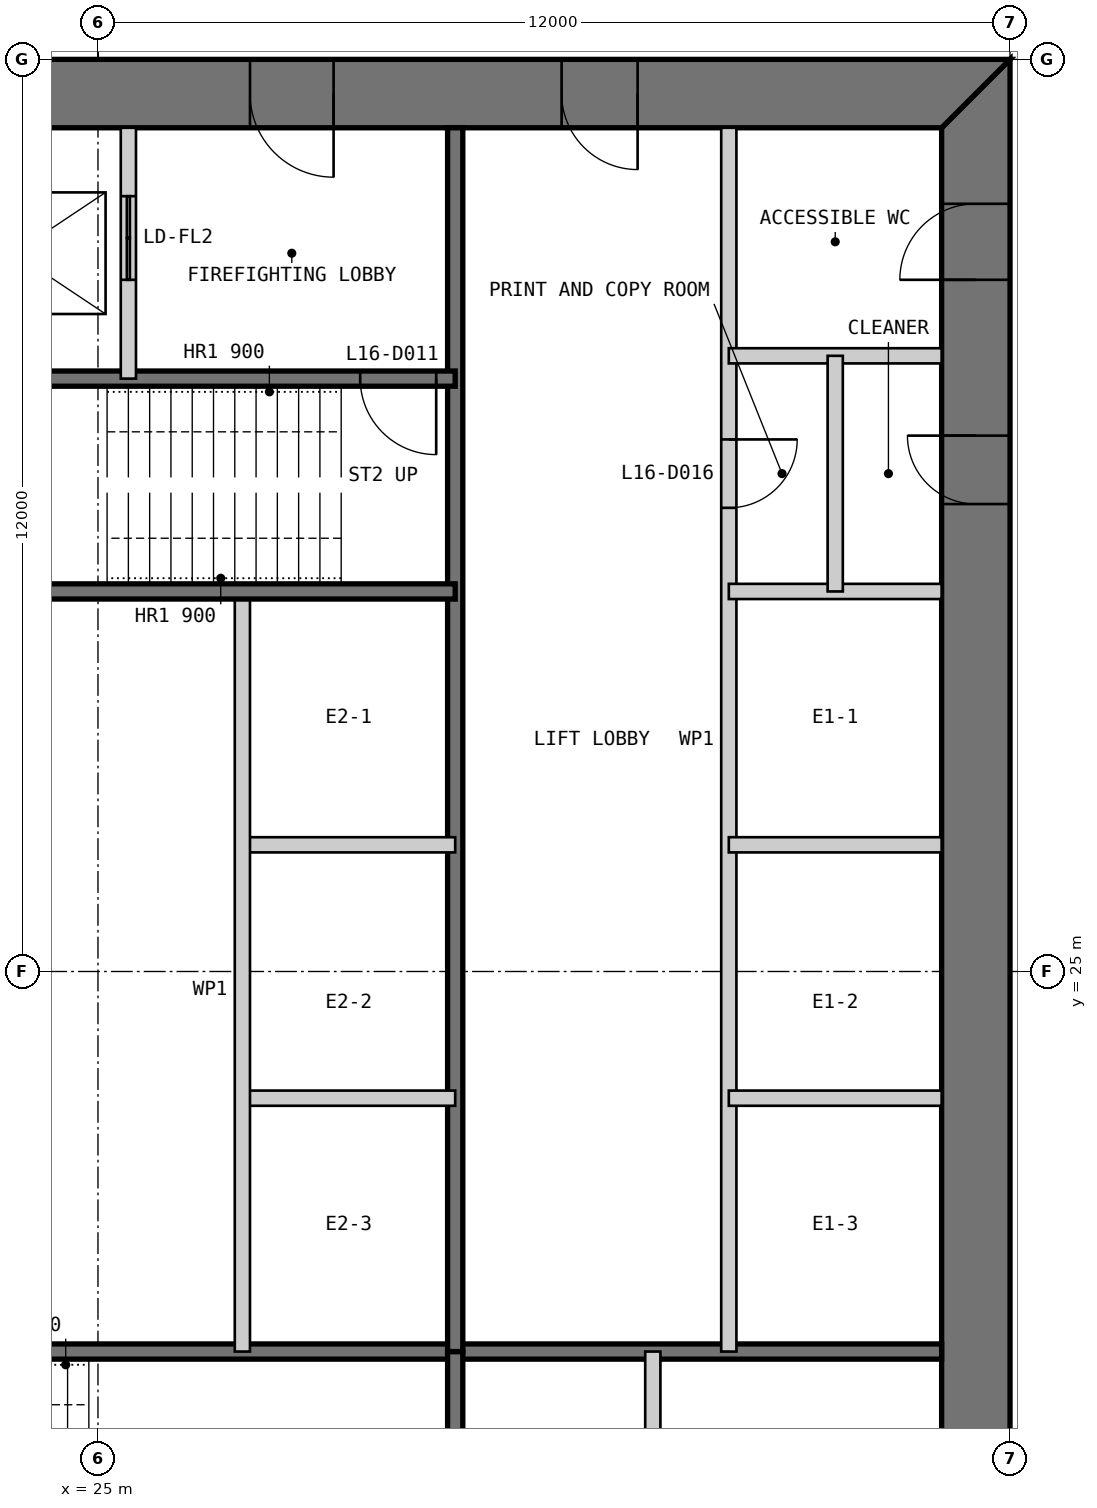
"""IFC4 building model, lengths in metres.
Left out: names, types, materials, properties, quantities, classifications, styles, units other than length and angle.
Written with IfcOpenShell. Run it as: python <this file> out.ifc"""

import sys

from ifc_helpers import new_model, si_unit, direction, frame, frame_2d, origin, place, context, subcontext, project, spatial, polyline, rectangle, outline, extrude, element, fill, save


model = new_model("IFC4")
c1 = context("Model", 3, precision=1e-05, world=origin(), true_north=direction((0.0, 1.0)))
c2 = subcontext(c1, "Body", "Model", "MODEL_VIEW")
j1 = project(units=[si_unit("LENGTHUNIT", "METRE"), si_unit("PLANEANGLEUNIT", "RADIAN")], contexts=[c1])
p1 = place(None, origin())
s1 = spatial("IfcSite", under=j1, at=p1, CompositionType="ELEMENT")
p2 = place(p1, origin())
s2 = spatial("IfcBuilding", under=s1, at=p2, CompositionType="ELEMENT")
p3 = place(p2, frame((0.0, 0.0, 71.0)))
s3 = spatial("IfcBuildingStorey", under=s2, at=p3, CompositionType="ELEMENT", Elevation=71.0)
p4 = place(p3, frame((36.55, 13.9, 0.0), z_axis=(0.0, 0.0, 1.0), x_axis=(0.0, 1.0, 0.0)))
e1 = element("IfcWall", 1, at=p4, inside=s3, PredefinedType="SHEAR", context=c2, shape_type="SweptSolid", body=[
    extrude(outline(polyline([(-0.9, -0.45), (23.1, -0.45), (22.2, 0.45), (0.0, 0.45), (-0.9, -0.45)])), origin(), (0.0, 0.0, 1.0), 4.0),
])
p5 = place(p4, frame((20.2, 0.0, 0.0)))
e2 = element("IfcOpeningElement", 2, at=p5, cuts=e1, PredefinedType="OPENING", context=c2, shape_type="SweptSolid", body=[
    extrude(rectangle(XDim=1.0, YDim=2.2, at=frame_2d((0.5, 1.1))), frame((0.0, 0.46, 0.0), z_axis=(0.0, -1.0, 0.0), x_axis=(1.0, 0.0, 0.0)), (0.0, 0.0, 1.0), 0.92),
])
p6 = place(p4, frame((17.25, 0.0, 0.0)))
e3 = element("IfcOpeningElement", 3, at=p6, cuts=e1, PredefinedType="OPENING", context=c2, shape_type="SweptSolid", body=[
    extrude(rectangle(XDim=0.9, YDim=2.2, at=frame_2d((0.45, 1.1))), frame((0.0, 0.46, 0.0), z_axis=(0.0, -1.0, 0.0), x_axis=(1.0, 0.0, 0.0)), (0.0, 0.0, 1.0), 0.92),
])
p7 = place(p3, frame((37.0, 36.55, 0.0), z_axis=(0.0, 0.0, 1.0), x_axis=(-1.0, 0.0, 0.0)))
e4 = element("IfcWall", 4, at=p7, inside=s3, PredefinedType="SHEAR", context=c2, shape_type="SweptSolid", body=[
    extrude(outline(polyline([(0.0, -0.45), (24.0, -0.45), (23.1, 0.45), (0.9, 0.45), (0.0, -0.45)])), origin(), (0.0, 0.0, 1.0), 4.0),
])
p8 = place(p7, frame((4.9, 0.0, 0.0)))
e5 = element("IfcOpeningElement", 5, at=p8, cuts=e4, PredefinedType="OPENING", context=c2, shape_type="SweptSolid", body=[
    extrude(rectangle(XDim=1.0, YDim=2.2, at=frame_2d((0.5, 1.1))), frame((0.0, 0.46, 0.0), z_axis=(0.0, -1.0, 0.0), x_axis=(1.0, 0.0, 0.0)), (0.0, 0.0, 1.0), 0.92),
])
p9 = place(p7, frame((8.9, 0.0, 0.0)))
e6 = element("IfcOpeningElement", 6, at=p9, cuts=e4, PredefinedType="OPENING", context=c2, shape_type="SweptSolid", body=[
    extrude(rectangle(XDim=1.1, YDim=2.2, at=frame_2d((0.55, 1.1))), frame((0.0, 0.46, 0.0), z_axis=(0.0, -1.0, 0.0), x_axis=(1.0, 0.0, 0.0)), (0.0, 0.0, 1.0), 0.92),
])
p10 = place(p7, frame((15.05, 0.0, 0.0)))
e7 = element("IfcOpeningElement", 7, at=p10, cuts=e4, PredefinedType="OPENING", context=c2, shape_type="SweptSolid", body=[
    extrude(rectangle(XDim=0.9, YDim=2.2, at=frame_2d((0.45, 1.1))), frame((0.0, 0.46, 0.0), z_axis=(0.0, -1.0, 0.0), x_axis=(1.0, 0.0, 0.0)), (0.0, 0.0, 1.0), 0.92),
])
p11 = place(p7, frame((17.9, 0.0, 0.0)))
e8 = element("IfcOpeningElement", 8, at=p11, cuts=e4, PredefinedType="OPENING", context=c2, shape_type="SweptSolid", body=[
    extrude(rectangle(XDim=1.0, YDim=2.2, at=frame_2d((0.5, 1.1))), frame((0.0, 0.46, 0.0), z_axis=(0.0, -1.0, 0.0), x_axis=(1.0, 0.0, 0.0)), (0.0, 0.0, 1.0), 0.92),
])
p12 = place(p7, frame((21.4, 0.0, 0.0)))
e9 = element("IfcOpeningElement", 9, at=p12, cuts=e4, PredefinedType="OPENING", context=c2, shape_type="SweptSolid", body=[
    extrude(rectangle(XDim=1.0, YDim=2.2, at=frame_2d((0.5, 1.1))), frame((0.0, 0.46, 0.0), z_axis=(0.0, -1.0, 0.0), x_axis=(1.0, 0.0, 0.0)), (0.0, 0.0, 1.0), 0.92),
])
p13 = place(p3, frame((20.3, 20.0, 0.0), z_axis=(0.0, 0.0, 1.0), x_axis=(1.0, 0.0, 0.0)))
e10 = element("IfcWall", 10, at=p13, inside=s3, PredefinedType="SOLIDWALL", context=c2, shape_type="SweptSolid", body=[
    extrude(rectangle(XDim=15.8, YDim=0.2, at=frame_2d((7.9, 0.0))), origin(), (0.0, 0.0, 1.0), 3.8),
])
p14 = place(p3, frame((29.7, 13.9, 0.0), z_axis=(0.0, 0.0, 1.0), x_axis=(0.0, 1.0, 0.0)))
e11 = element("IfcWall", 11, at=p14, inside=s3, PredefinedType="SOLIDWALL", context=c2, shape_type="SweptSolid", body=[
    extrude(rectangle(XDim=6.1, YDim=0.2, at=frame_2d((3.05, 0.0))), origin(), (0.0, 0.0, 1.0), 3.8),
])
p15 = place(p3, frame((32.3, 13.9, 0.0), z_axis=(0.0, 0.0, 1.0), x_axis=(0.0, 1.0, 0.0)))
e12 = element("IfcWall", 12, at=p15, inside=s3, PredefinedType="PARTITIONING", context=c2, shape_type="SweptSolid", body=[
    extrude(rectangle(XDim=6.1, YDim=0.2, at=frame_2d((3.05, 0.0))), origin(), (0.0, 0.0, 1.0), 3.8),
])
p16 = place(p3, frame((33.3, 36.1, 0.0), z_axis=(0.0, 0.0, 1.0), x_axis=(0.0, -1.0, 0.0)))
e13 = element("IfcWall", 13, at=p16, inside=s3, PredefinedType="PARTITIONING", context=c2, shape_type="SweptSolid", body=[
    extrude(rectangle(XDim=16.1, YDim=0.2, at=frame_2d((8.05, 0.0))), origin(), (0.0, 0.0, 1.0), 3.8),
])
p17 = place(p16, frame((4.1, 0.0, 0.0)))
e14 = element("IfcOpeningElement", 14, at=p17, cuts=e13, PredefinedType="OPENING", context=c2, shape_type="SweptSolid", body=[
    extrude(rectangle(XDim=0.9, YDim=2.2, at=frame_2d((0.45, 1.1))), frame((0.0, 0.11, 0.0), z_axis=(0.0, -1.0, 0.0), x_axis=(1.0, 0.0, 0.0)), (0.0, 0.0, 1.0), 0.22),
])
p18 = place(p3, frame((29.7, 36.1, 0.0), z_axis=(0.0, 0.0, 1.0), x_axis=(0.0, -1.0, 0.0)))
e15 = element("IfcWall", 15, at=p18, inside=s3, PredefinedType="SOLIDWALL", context=c2, shape_type="SweptSolid", body=[
    extrude(rectangle(XDim=16.1, YDim=0.2, at=frame_2d((8.05, 0.0))), origin(), (0.0, 0.0, 1.0), 3.8),
])
for number, where, z_axis, x_axis in (
    (16, (36.1, 30.0, 0.0), (0.0, 0.0, 1.0), (-1.0, 0.0, 0.0)),
    (17, (36.1, 26.667, 0.0), (0.0, 0.0, 1.0), (-1.0, 0.0, 0.0)),
    (18, (36.1, 23.333, 0.0), (0.0, 0.0, 1.0), (-1.0, 0.0, 0.0)),
    (19, (29.7, 26.667, 0.0), (0.0, 0.0, 1.0), (-1.0, 0.0, 0.0)),
    (20, (29.7, 23.333, 0.0), (0.0, 0.0, 1.0), (-1.0, 0.0, 0.0)),
):
    element("IfcWall", number, at=place(p3, frame(where, z_axis=z_axis, x_axis=x_axis)), inside=s3, PredefinedType="PARTITIONING", context=c2, shape_type="SweptSolid", body=[
        extrude(rectangle(XDim=2.8, YDim=0.2, at=frame_2d((1.4, 0.0))), origin(), (0.0, 0.0, 1.0), 3.8),
    ])
p19 = place(p3, frame((26.9, 30.0, 0.0), z_axis=(0.0, 0.0, 1.0), x_axis=(0.0, -1.0, 0.0)))
e21 = element("IfcWall", 21, at=p19, inside=s3, PredefinedType="PARTITIONING", context=c2, shape_type="SweptSolid", body=[
    extrude(rectangle(XDim=10.0, YDim=0.2, at=frame_2d((5.0, 0.0))), origin(), (0.0, 0.0, 1.0), 3.8),
])
p20 = place(p3, frame((29.7, 32.8, 0.0), z_axis=(0.0, 0.0, 1.0), x_axis=(-1.0, 0.0, 0.0)))
e22 = element("IfcWall", 22, at=p20, inside=s3, PredefinedType="SOLIDWALL", context=c2, shape_type="SweptSolid", body=[
    extrude(rectangle(XDim=9.4, YDim=0.2, at=frame_2d((4.7, 0.0))), origin(), (0.0, 0.0, 1.0), 3.8),
])
p21 = place(p20, frame((0.25, 0.0, 0.0)))
e23 = element("IfcOpeningElement", 23, at=p21, cuts=e22, PredefinedType="OPENING", context=c2, shape_type="SweptSolid", body=[
    extrude(rectangle(XDim=1.0, YDim=2.2, at=frame_2d((0.5, 1.1))), frame((0.0, 0.11, 0.0), z_axis=(0.0, -1.0, 0.0), x_axis=(1.0, 0.0, 0.0)), (0.0, 0.0, 1.0), 0.22),
])
p22 = place(p3, frame((29.7, 30.0, 0.0), z_axis=(0.0, 0.0, 1.0), x_axis=(-1.0, 0.0, 0.0)))
e24 = element("IfcWall", 24, at=p22, inside=s3, PredefinedType="SOLIDWALL", context=c2, shape_type="SweptSolid", body=[
    extrude(rectangle(XDim=15.8, YDim=0.2, at=frame_2d((7.9, 0.0))), origin(), (0.0, 0.0, 1.0), 3.8),
])
p23 = place(p3, frame((25.4, 36.1, 0.0), z_axis=(0.0, 0.0, 1.0), x_axis=(0.0, -1.0, 0.0)))
e25 = element("IfcWall", 25, at=p23, inside=s3, PredefinedType="PARTITIONING", context=c2, shape_type="SweptSolid", body=[
    extrude(rectangle(XDim=3.3, YDim=0.2, at=frame_2d((1.65, 0.0))), origin(), (0.0, 0.0, 1.0), 3.8),
])
p24 = place(p23, frame((0.9, 0.0, 0.0)))
e26 = element("IfcOpeningElement", 26, at=p24, cuts=e25, PredefinedType="OPENING", context=c2, shape_type="SweptSolid", body=[
    extrude(rectangle(XDim=1.1, YDim=2.2, at=frame_2d((0.55, 1.1))), frame((0.0, 0.11, 0.0), z_axis=(0.0, -1.0, 0.0), x_axis=(1.0, 0.0, 0.0)), (0.0, 0.0, 1.0), 0.22),
])
p25 = place(p3, frame((36.1, 33.1, 0.0), z_axis=(0.0, 0.0, 1.0), x_axis=(-1.0, 0.0, 0.0)))
e27 = element("IfcWall", 27, at=p25, inside=s3, PredefinedType="PARTITIONING", context=c2, shape_type="SweptSolid", body=[
    extrude(rectangle(XDim=2.8, YDim=0.2, at=frame_2d((1.4, 0.0))), origin(), (0.0, 0.0, 1.0), 3.8),
])
p26 = place(p3, frame((34.7, 33.1, 0.0), z_axis=(0.0, 0.0, 1.0), x_axis=(0.0, -1.0, 0.0)))
e28 = element("IfcWall", 28, at=p26, inside=s3, PredefinedType="PARTITIONING", context=c2, shape_type="SweptSolid", body=[
    extrude(rectangle(XDim=3.1, YDim=0.2, at=frame_2d((1.55, 0.0))), origin(), (0.0, 0.0, 1.0), 3.8),
])
p27 = place(p8, origin())
e29 = element("IfcDoor", 29, at=p27, inside=s3, OperationType="SINGLE_SWING_LEFT", PredefinedType="DOOR", context=c2, shape_type="SweptSolid", body=[
    extrude(rectangle(XDim=1.0, YDim=2.2, at=frame_2d((0.5, 1.1))), frame((0.0, 0.025, 0.0), z_axis=(0.0, -1.0, 0.0), x_axis=(1.0, 0.0, 0.0)), (0.0, 0.0, 1.0), 0.05),
    extrude(outline(polyline([(0.0, 0.0), (0.04, 0.0), (0.04, 2.16), (0.96, 2.16), (0.96, 0.0), (1.0, 0.0), (1.0, 2.2), (0.0, 2.2), (0.0, 0.0)])), frame((0.0, 0.3, 0.0), z_axis=(0.0, -1.0, 0.0), x_axis=(1.0, 0.0, 0.0)), (0.0, 0.0, 1.0), 0.6),
])
fill(e5, e29)
p28 = place(p9, origin())
e30 = element("IfcDoor", 30, at=p28, inside=s3, OperationType="SINGLE_SWING_LEFT", PredefinedType="DOOR", context=c2, shape_type="SweptSolid", body=[
    extrude(rectangle(XDim=1.1, YDim=2.2, at=frame_2d((0.55, 1.1))), frame((0.0, 0.025, 0.0), z_axis=(0.0, -1.0, 0.0), x_axis=(1.0, 0.0, 0.0)), (0.0, 0.0, 1.0), 0.05),
    extrude(outline(polyline([(0.0, 0.0), (0.04, 0.0), (0.04, 2.16), (1.06, 2.16), (1.06, 0.0), (1.1, 0.0), (1.1, 2.2), (0.0, 2.2), (0.0, 0.0)])), frame((0.0, 0.3, 0.0), z_axis=(0.0, -1.0, 0.0), x_axis=(1.0, 0.0, 0.0)), (0.0, 0.0, 1.0), 0.6),
])
fill(e6, e30)
p29 = place(p21, origin())
e31 = element("IfcDoor", 31, at=p29, inside=s3, OperationType="SINGLE_SWING_LEFT", PredefinedType="DOOR", context=c2, shape_type="SweptSolid", body=[
    extrude(rectangle(XDim=1.0, YDim=2.2, at=frame_2d((0.5, 1.1))), frame((0.0, 0.025, 0.0), z_axis=(0.0, -1.0, 0.0), x_axis=(1.0, 0.0, 0.0)), (0.0, 0.0, 1.0), 0.05),
])
fill(e23, e31)
p30 = place(p5, origin())
e32 = element("IfcDoor", 32, at=p30, inside=s3, OperationType="SINGLE_SWING_LEFT", PredefinedType="DOOR", context=c2, shape_type="SweptSolid", body=[
    extrude(rectangle(XDim=1.0, YDim=2.2, at=frame_2d((0.5, 1.1))), frame((0.0, 0.025, 0.0), z_axis=(0.0, -1.0, 0.0), x_axis=(1.0, 0.0, 0.0)), (0.0, 0.0, 1.0), 0.05),
    extrude(outline(polyline([(0.0, 0.0), (0.04, 0.0), (0.04, 2.16), (0.96, 2.16), (0.96, 0.0), (1.0, 0.0), (1.0, 2.2), (0.0, 2.2), (0.0, 0.0)])), frame((0.0, 0.3, 0.0), z_axis=(0.0, -1.0, 0.0), x_axis=(1.0, 0.0, 0.0)), (0.0, 0.0, 1.0), 0.6),
])
fill(e2, e32)
p31 = place(p17, origin())
e33 = element("IfcDoor", 33, at=p31, inside=s3, OperationType="SINGLE_SWING_LEFT", PredefinedType="DOOR", context=c2, shape_type="SweptSolid", body=[
    extrude(rectangle(XDim=0.9, YDim=2.2, at=frame_2d((0.45, 1.1))), frame((0.0, 0.025, 0.0), z_axis=(0.0, -1.0, 0.0), x_axis=(1.0, 0.0, 0.0)), (0.0, 0.0, 1.0), 0.05),
])
fill(e14, e33)
p32 = place(p6, origin())
e34 = element("IfcDoor", 34, at=p32, inside=s3, OperationType="SINGLE_SWING_RIGHT", PredefinedType="DOOR", context=c2, shape_type="SweptSolid", body=[
    extrude(rectangle(XDim=0.9, YDim=2.2, at=frame_2d((0.45, 1.1))), frame((0.0, 0.025, 0.0), z_axis=(0.0, -1.0, 0.0), x_axis=(1.0, 0.0, 0.0)), (0.0, 0.0, 1.0), 0.05),
    extrude(outline(polyline([(0.0, 0.0), (0.04, 0.0), (0.04, 2.16), (0.86, 2.16), (0.86, 0.0), (0.9, 0.0), (0.9, 2.2), (0.0, 2.2), (0.0, 0.0)])), frame((0.0, 0.3, 0.0), z_axis=(0.0, -1.0, 0.0), x_axis=(1.0, 0.0, 0.0)), (0.0, 0.0, 1.0), 0.6),
])
fill(e3, e34)
p33 = place(p24, origin())
e35 = element("IfcDoor", 35, at=p33, inside=s3, OperationType="DOUBLE_DOOR_SLIDING", PredefinedType="DOOR", context=c2, shape_type="SweptSolid", body=[
    extrude(rectangle(XDim=1.1, YDim=2.2, at=frame_2d((0.55, 1.1))), frame((0.0, 0.025, 0.0), z_axis=(0.0, -1.0, 0.0), x_axis=(1.0, 0.0, 0.0)), (0.0, 0.0, 1.0), 0.05),
])
fill(e26, e35)
save(model, sys.argv[1])
